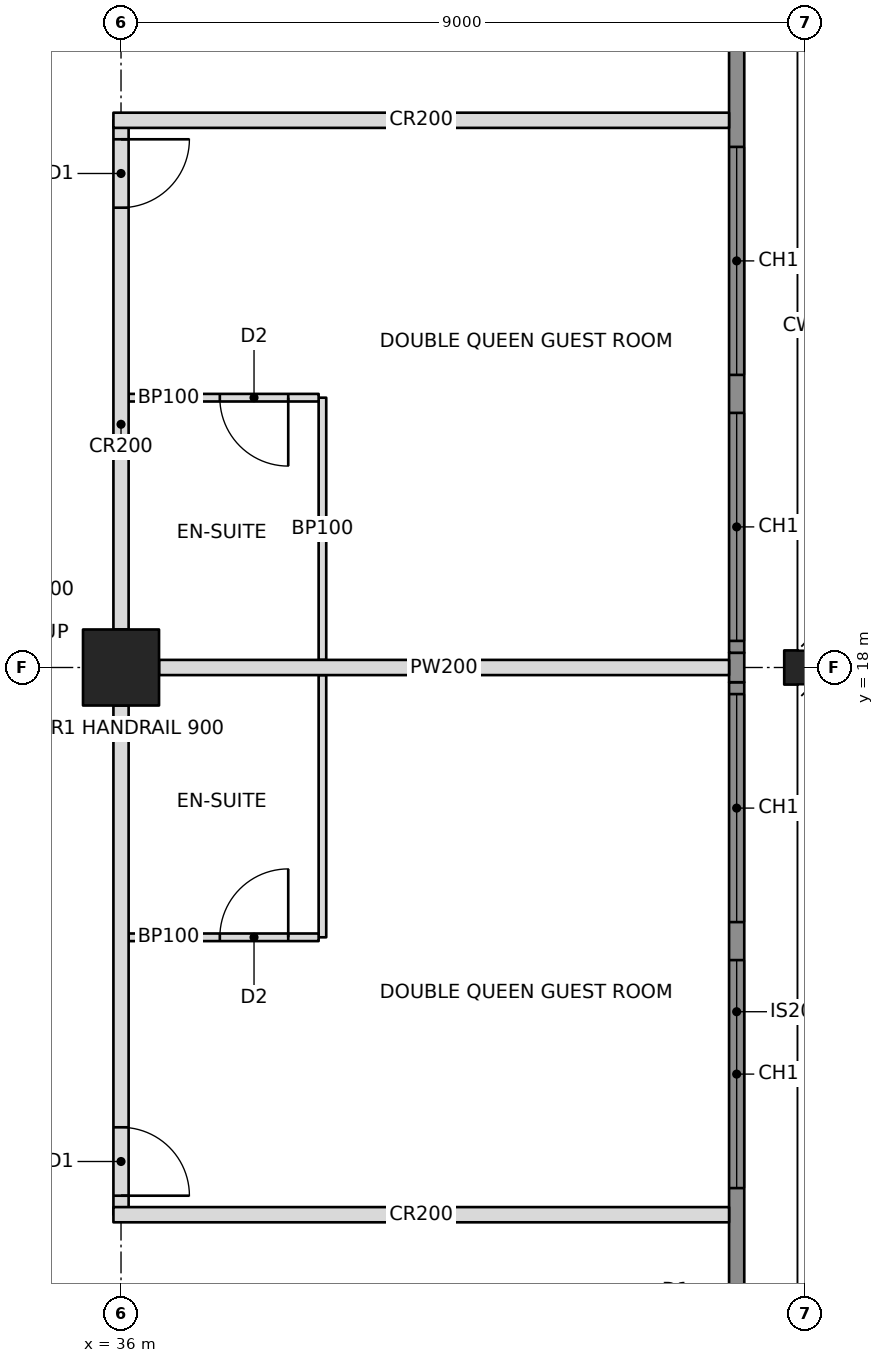
"""IFC4 building model, lengths in metres.
Left out: names, types, materials, properties, quantities, classifications, styles, units other than length and angle.
Written with IfcOpenShell. Run it as: python <this file> out.ifc"""

import sys

from ifc_helpers import new_model, si_unit, direction, frame, frame_2d, origin, origin_2d, place, context, subcontext, project, spatial, rectangle, hollow_rectangle, i_section, extrude, element, fill, save


model = new_model("IFC4")
c1 = context("Model", 3, precision=1e-05, world=origin(), true_north=direction((0.0, 1.0)))
c2 = subcontext(c1, "Body", "Model", "MODEL_VIEW")
j1 = project(units=[si_unit("LENGTHUNIT", "METRE"), si_unit("PLANEANGLEUNIT", "RADIAN")], contexts=[c1])
p1 = place(None, origin())
s1 = spatial("IfcSite", under=j1, at=p1, CompositionType="ELEMENT")
p2 = place(p1, origin())
s2 = spatial("IfcBuilding", under=s1, at=p2, CompositionType="ELEMENT")
p3 = place(p2, frame((0.0, 0.0, 97.6)))
s3 = spatial("IfcBuildingStorey", under=s2, at=p3, CompositionType="ELEMENT", Elevation=97.6)
p4 = place(p3, frame((36.0, 18.0, 0.0), z_axis=(0.0, 0.0, 1.0), x_axis=(0.0, 1.0, 0.0)))
e1 = element("IfcColumn", 1, at=p4, inside=s3, PredefinedType="COLUMN", context=c2, shape_type="SweptSolid", body=[
    extrude(hollow_rectangle(XDim=1.0, YDim=1.0, WallThickness=0.1, at=origin_2d()), origin(), (0.0, 0.0, 1.0), 3.4),
])
p5 = place(p3, frame((45.0, 18.0, 0.0), z_axis=(0.0, 0.0, 1.0), x_axis=(0.0, 1.0, 0.0)))
e2 = element("IfcColumn", 2, at=p5, inside=s3, PredefinedType="COLUMN", context=c2, shape_type="SweptSolid", body=[
    extrude(i_section(OverallWidth=0.449, OverallDepth=0.549, WebThickness=0.072, FlangeThickness=0.115, at=origin_2d()), origin(), (0.0, 0.0, 1.0), 3.4),
])
p6 = place(p3, frame((36.0, 10.8, 0.0), z_axis=(0.0, 0.0, 1.0), x_axis=(0.0, 1.0, 0.0)))
e3 = element("IfcWall", 3, at=p6, inside=s3, PredefinedType="PARTITIONING", context=c2, shape_type="SweptSolid", body=[
    extrude(rectangle(XDim=6.7, YDim=0.2, at=frame_2d((3.35, 0.0))), origin(), (0.0, 0.0, 1.0), 2.405),
])
p7 = place(p6, frame((0.25, 0.0, 0.0)))
e4 = element("IfcOpeningElement", 4, at=p7, cuts=e3, PredefinedType="OPENING", context=c2, shape_type="SweptSolid", body=[
    extrude(rectangle(XDim=0.9, YDim=2.1, at=frame_2d((0.45, 1.05))), frame((0.0, 0.11, 0.0), z_axis=(0.0, -1.0, 0.0), x_axis=(1.0, 0.0, 0.0)), (0.0, 0.0, 1.0), 0.22),
])
p8 = place(p3, frame((36.0, 18.5, 0.0), z_axis=(0.0, 0.0, 1.0), x_axis=(0.0, 1.0, 0.0)))
e5 = element("IfcWall", 5, at=p8, inside=s3, PredefinedType="PARTITIONING", context=c2, shape_type="SweptSolid", body=[
    extrude(rectangle(XDim=6.7, YDim=0.2, at=frame_2d((3.35, 0.0))), origin(), (0.0, 0.0, 1.0), 2.405),
])
p9 = place(p8, frame((5.55, 0.0, 0.0)))
e6 = element("IfcOpeningElement", 6, at=p9, cuts=e5, PredefinedType="OPENING", context=c2, shape_type="SweptSolid", body=[
    extrude(rectangle(XDim=0.9, YDim=2.1, at=frame_2d((0.45, 1.05))), frame((0.0, 0.11, 0.0), z_axis=(0.0, -1.0, 0.0), x_axis=(1.0, 0.0, 0.0)), (0.0, 0.0, 1.0), 0.22),
])
for number, where, z_axis, x_axis in (
    (7, (35.9, 10.8, 0.0), (0.0, 0.0, 1.0), (1.0, 0.0, 0.0)),
    (8, (35.9, 25.2, 0.0), (0.0, 0.0, 1.0), (1.0, 0.0, 0.0)),
):
    element("IfcWall", number, at=place(p3, frame(where, z_axis=z_axis, x_axis=x_axis)), inside=s3, PredefinedType="PARTITIONING", context=c2, shape_type="SweptSolid", body=[
        extrude(rectangle(XDim=8.1, YDim=0.2, at=frame_2d((4.05, 0.0))), origin(), (0.0, 0.0, 1.0), 2.404),
    ])
p10 = place(p3, frame((36.5, 18.0, 0.0), z_axis=(0.0, 0.0, 1.0), x_axis=(1.0, 0.0, 0.0)))
e9 = element("IfcWall", 9, at=p10, inside=s3, PredefinedType="PARTITIONING", context=c2, shape_type="SweptSolid", body=[
    extrude(rectangle(XDim=7.5, YDim=0.2, at=frame_2d((3.75, 0.0))), origin(), (0.0, 0.0, 1.0), 2.405),
])
p11 = place(p3, frame((38.65, 14.45, 0.0), z_axis=(0.0, 0.0, 1.0), x_axis=(0.0, 1.0, 0.0)))
e10 = element("IfcWall", 10, at=p11, inside=s3, PredefinedType="PARTITIONING", context=c2, shape_type="SweptSolid", body=[
    extrude(rectangle(XDim=3.45, YDim=0.1, at=frame_2d((1.725, 0.0))), origin(), (0.0, 0.0, 1.0), 2.404),
])
p12 = place(p3, frame((36.1, 14.45, 0.0), z_axis=(0.0, 0.0, 1.0), x_axis=(1.0, 0.0, 0.0)))
e11 = element("IfcWall", 11, at=p12, inside=s3, PredefinedType="PARTITIONING", context=c2, shape_type="SweptSolid", body=[
    extrude(rectangle(XDim=2.5, YDim=0.1, at=frame_2d((1.25, 0.0))), origin(), (0.0, 0.0, 1.0), 2.404),
])
p13 = place(p12, frame((1.2, 0.0, 0.0)))
e12 = element("IfcOpeningElement", 12, at=p13, cuts=e11, PredefinedType="OPENING", context=c2, shape_type="SweptSolid", body=[
    extrude(rectangle(XDim=0.9, YDim=2.1, at=frame_2d((0.45, 1.05))), frame((0.0, 0.06, 0.0), z_axis=(0.0, -1.0, 0.0), x_axis=(1.0, 0.0, 0.0)), (0.0, 0.0, 1.0), 0.12),
])
p14 = place(p3, frame((38.65, 18.1, 0.0), z_axis=(0.0, 0.0, 1.0), x_axis=(0.0, 1.0, 0.0)))
e13 = element("IfcWall", 13, at=p14, inside=s3, PredefinedType="PARTITIONING", context=c2, shape_type="SweptSolid", body=[
    extrude(rectangle(XDim=3.45, YDim=0.1, at=frame_2d((1.725, 0.0))), origin(), (0.0, 0.0, 1.0), 2.404),
])
p15 = place(p3, frame((36.1, 21.55, 0.0), z_axis=(0.0, 0.0, 1.0), x_axis=(1.0, 0.0, 0.0)))
e14 = element("IfcWall", 14, at=p15, inside=s3, PredefinedType="PARTITIONING", context=c2, shape_type="SweptSolid", body=[
    extrude(rectangle(XDim=2.5, YDim=0.1, at=frame_2d((1.25, 0.0))), origin(), (0.0, 0.0, 1.0), 2.404),
])
p16 = place(p15, frame((1.2, 0.0, 0.0)))
e15 = element("IfcOpeningElement", 15, at=p16, cuts=e14, PredefinedType="OPENING", context=c2, shape_type="SweptSolid", body=[
    extrude(rectangle(XDim=0.9, YDim=2.1, at=frame_2d((0.45, 1.05))), frame((0.0, 0.06, 0.0), z_axis=(0.0, -1.0, 0.0), x_axis=(1.0, 0.0, 0.0)), (0.0, 0.0, 1.0), 0.12),
])
p17 = place(p3, frame((44.1, 9.135, 0.0), z_axis=(0.0, 0.0, 1.0), x_axis=(0.0, 1.0, 0.0)))
e16 = element("IfcWall", 16, at=p17, inside=s3, PredefinedType="SOLIDWALL", context=c2, shape_type="SweptSolid", body=[
    extrude(rectangle(XDim=8.671, YDim=0.2, at=frame_2d((4.335, 0.0))), origin(), (0.0, 0.0, 1.0), 3.2),
])
p18 = place(p17, frame((2.015, 0.0, 0.6)))
e17 = element("IfcOpeningElement", 17, at=p18, cuts=e16, PredefinedType="OPENING", context=c2, shape_type="SweptSolid", body=[
    extrude(rectangle(XDim=3.0, YDim=2.2, at=frame_2d((1.5, 1.1))), frame((0.0, 0.11, 0.0), z_axis=(0.0, -1.0, 0.0), x_axis=(1.0, 0.0, 0.0)), (0.0, 0.0, 1.0), 0.22),
])
p19 = place(p17, frame((5.515, 0.0, 0.6)))
e18 = element("IfcOpeningElement", 18, at=p19, cuts=e16, PredefinedType="OPENING", context=c2, shape_type="SweptSolid", body=[
    extrude(rectangle(XDim=3.0, YDim=2.2, at=frame_2d((1.5, 1.1))), frame((0.0, 0.11, 0.0), z_axis=(0.0, -1.0, 0.0), x_axis=(1.0, 0.0, 0.0)), (0.0, 0.0, 1.0), 0.22),
])
p20 = place(p3, frame((44.1, 17.806, 0.0), z_axis=(0.0, 0.0, 1.0), x_axis=(0.0, 1.0, 0.0)))
e19 = element("IfcWall", 19, at=p20, inside=s3, PredefinedType="SOLIDWALL", context=c2, shape_type="SweptSolid", body=[
    extrude(rectangle(XDim=0.388, YDim=0.2, at=frame_2d((0.194, 0.0))), origin(), (0.0, 0.0, 1.0), 2.404),
])
p21 = place(p3, frame((44.1, 18.194, 0.0), z_axis=(0.0, 0.0, 1.0), x_axis=(0.0, 1.0, 0.0)))
e20 = element("IfcWall", 20, at=p21, inside=s3, PredefinedType="SOLIDWALL", context=c2, shape_type="SweptSolid", body=[
    extrude(rectangle(XDim=8.671, YDim=0.2, at=frame_2d((4.335, 0.0))), origin(), (0.0, 0.0, 1.0), 3.2),
])
p22 = place(p21, frame((0.156, 0.0, 0.6)))
e21 = element("IfcOpeningElement", 21, at=p22, cuts=e20, PredefinedType="OPENING", context=c2, shape_type="SweptSolid", body=[
    extrude(rectangle(XDim=3.0, YDim=2.2, at=frame_2d((1.5, 1.1))), frame((0.0, 0.11, 0.0), z_axis=(0.0, -1.0, 0.0), x_axis=(1.0, 0.0, 0.0)), (0.0, 0.0, 1.0), 0.22),
])
p23 = place(p21, frame((3.656, 0.0, 0.6)))
e22 = element("IfcOpeningElement", 22, at=p23, cuts=e20, PredefinedType="OPENING", context=c2, shape_type="SweptSolid", body=[
    extrude(rectangle(XDim=3.0, YDim=2.2, at=frame_2d((1.5, 1.1))), frame((0.0, 0.11, 0.0), z_axis=(0.0, -1.0, 0.0), x_axis=(1.0, 0.0, 0.0)), (0.0, 0.0, 1.0), 0.22),
])
p24 = place(p18, origin())
e23 = element("IfcWindow", 23, at=p24, inside=s3, PartitioningType="TRIPLE_PANEL_VERTICAL", PredefinedType="WINDOW", context=c2, shape_type="SweptSolid", body=[
    extrude(rectangle(XDim=3.0, YDim=2.2, at=frame_2d((1.5, 1.1))), frame((0.0, 0.03, 0.0), z_axis=(0.0, -1.0, 0.0), x_axis=(1.0, 0.0, 0.0)), (0.0, 0.0, 1.0), 0.06),
])
fill(e17, e23)
p25 = place(p19, origin())
e24 = element("IfcWindow", 24, at=p25, inside=s3, PartitioningType="TRIPLE_PANEL_VERTICAL", PredefinedType="WINDOW", context=c2, shape_type="SweptSolid", body=[
    extrude(rectangle(XDim=3.0, YDim=2.2, at=frame_2d((1.5, 1.1))), frame((0.0, 0.03, 0.0), z_axis=(0.0, -1.0, 0.0), x_axis=(1.0, 0.0, 0.0)), (0.0, 0.0, 1.0), 0.06),
])
fill(e18, e24)
p26 = place(p22, origin())
e25 = element("IfcWindow", 25, at=p26, inside=s3, PartitioningType="TRIPLE_PANEL_VERTICAL", PredefinedType="WINDOW", context=c2, shape_type="SweptSolid", body=[
    extrude(rectangle(XDim=3.0, YDim=2.2, at=frame_2d((1.5, 1.1))), frame((0.0, 0.03, 0.0), z_axis=(0.0, -1.0, 0.0), x_axis=(1.0, 0.0, 0.0)), (0.0, 0.0, 1.0), 0.06),
])
fill(e21, e25)
p27 = place(p23, origin())
e26 = element("IfcWindow", 26, at=p27, inside=s3, PartitioningType="TRIPLE_PANEL_VERTICAL", PredefinedType="WINDOW", context=c2, shape_type="SweptSolid", body=[
    extrude(rectangle(XDim=3.0, YDim=2.2, at=frame_2d((1.5, 1.1))), frame((0.0, 0.03, 0.0), z_axis=(0.0, -1.0, 0.0), x_axis=(1.0, 0.0, 0.0)), (0.0, 0.0, 1.0), 0.06),
])
fill(e22, e26)
p28 = place(p13, origin())
e27 = element("IfcDoor", 27, at=p28, inside=s3, OperationType="SINGLE_SWING_RIGHT", PredefinedType="DOOR", context=c2, shape_type="SweptSolid", body=[
    extrude(rectangle(XDim=0.9, YDim=2.1, at=frame_2d((0.45, 1.05))), frame((0.0, 0.025, 0.0), z_axis=(0.0, -1.0, 0.0), x_axis=(1.0, 0.0, 0.0)), (0.0, 0.0, 1.0), 0.05),
])
fill(e12, e27)
p29 = place(p7, frame((0.9, 0.0, 0.0), z_axis=(0.0, 0.0, 1.0), x_axis=(-1.0, 0.0, 0.0)))
e28 = element("IfcDoor", 28, at=p29, inside=s3, OperationType="SINGLE_SWING_RIGHT", PredefinedType="DOOR", context=c2, shape_type="SweptSolid", body=[
    extrude(rectangle(XDim=0.9, YDim=2.1, at=frame_2d((0.45, 1.05))), frame((0.0, 0.025, 0.0), z_axis=(0.0, -1.0, 0.0), x_axis=(1.0, 0.0, 0.0)), (0.0, 0.0, 1.0), 0.05),
])
fill(e4, e28)
p30 = place(p16, frame((0.9, 0.0, 0.0), z_axis=(0.0, 0.0, 1.0), x_axis=(-1.0, 0.0, 0.0)))
e29 = element("IfcDoor", 29, at=p30, inside=s3, OperationType="SINGLE_SWING_LEFT", PredefinedType="DOOR", context=c2, shape_type="SweptSolid", body=[
    extrude(rectangle(XDim=0.9, YDim=2.1, at=frame_2d((0.45, 1.05))), frame((0.0, 0.025, 0.0), z_axis=(0.0, -1.0, 0.0), x_axis=(1.0, 0.0, 0.0)), (0.0, 0.0, 1.0), 0.05),
])
fill(e15, e29)
p31 = place(p9, frame((0.9, 0.0, 0.0), z_axis=(0.0, 0.0, 1.0), x_axis=(-1.0, 0.0, 0.0)))
e30 = element("IfcDoor", 30, at=p31, inside=s3, OperationType="SINGLE_SWING_LEFT", PredefinedType="DOOR", context=c2, shape_type="SweptSolid", body=[
    extrude(rectangle(XDim=0.9, YDim=2.1, at=frame_2d((0.45, 1.05))), frame((0.0, 0.025, 0.0), z_axis=(0.0, -1.0, 0.0), x_axis=(1.0, 0.0, 0.0)), (0.0, 0.0, 1.0), 0.05),
])
fill(e6, e30)
save(model, sys.argv[1])
